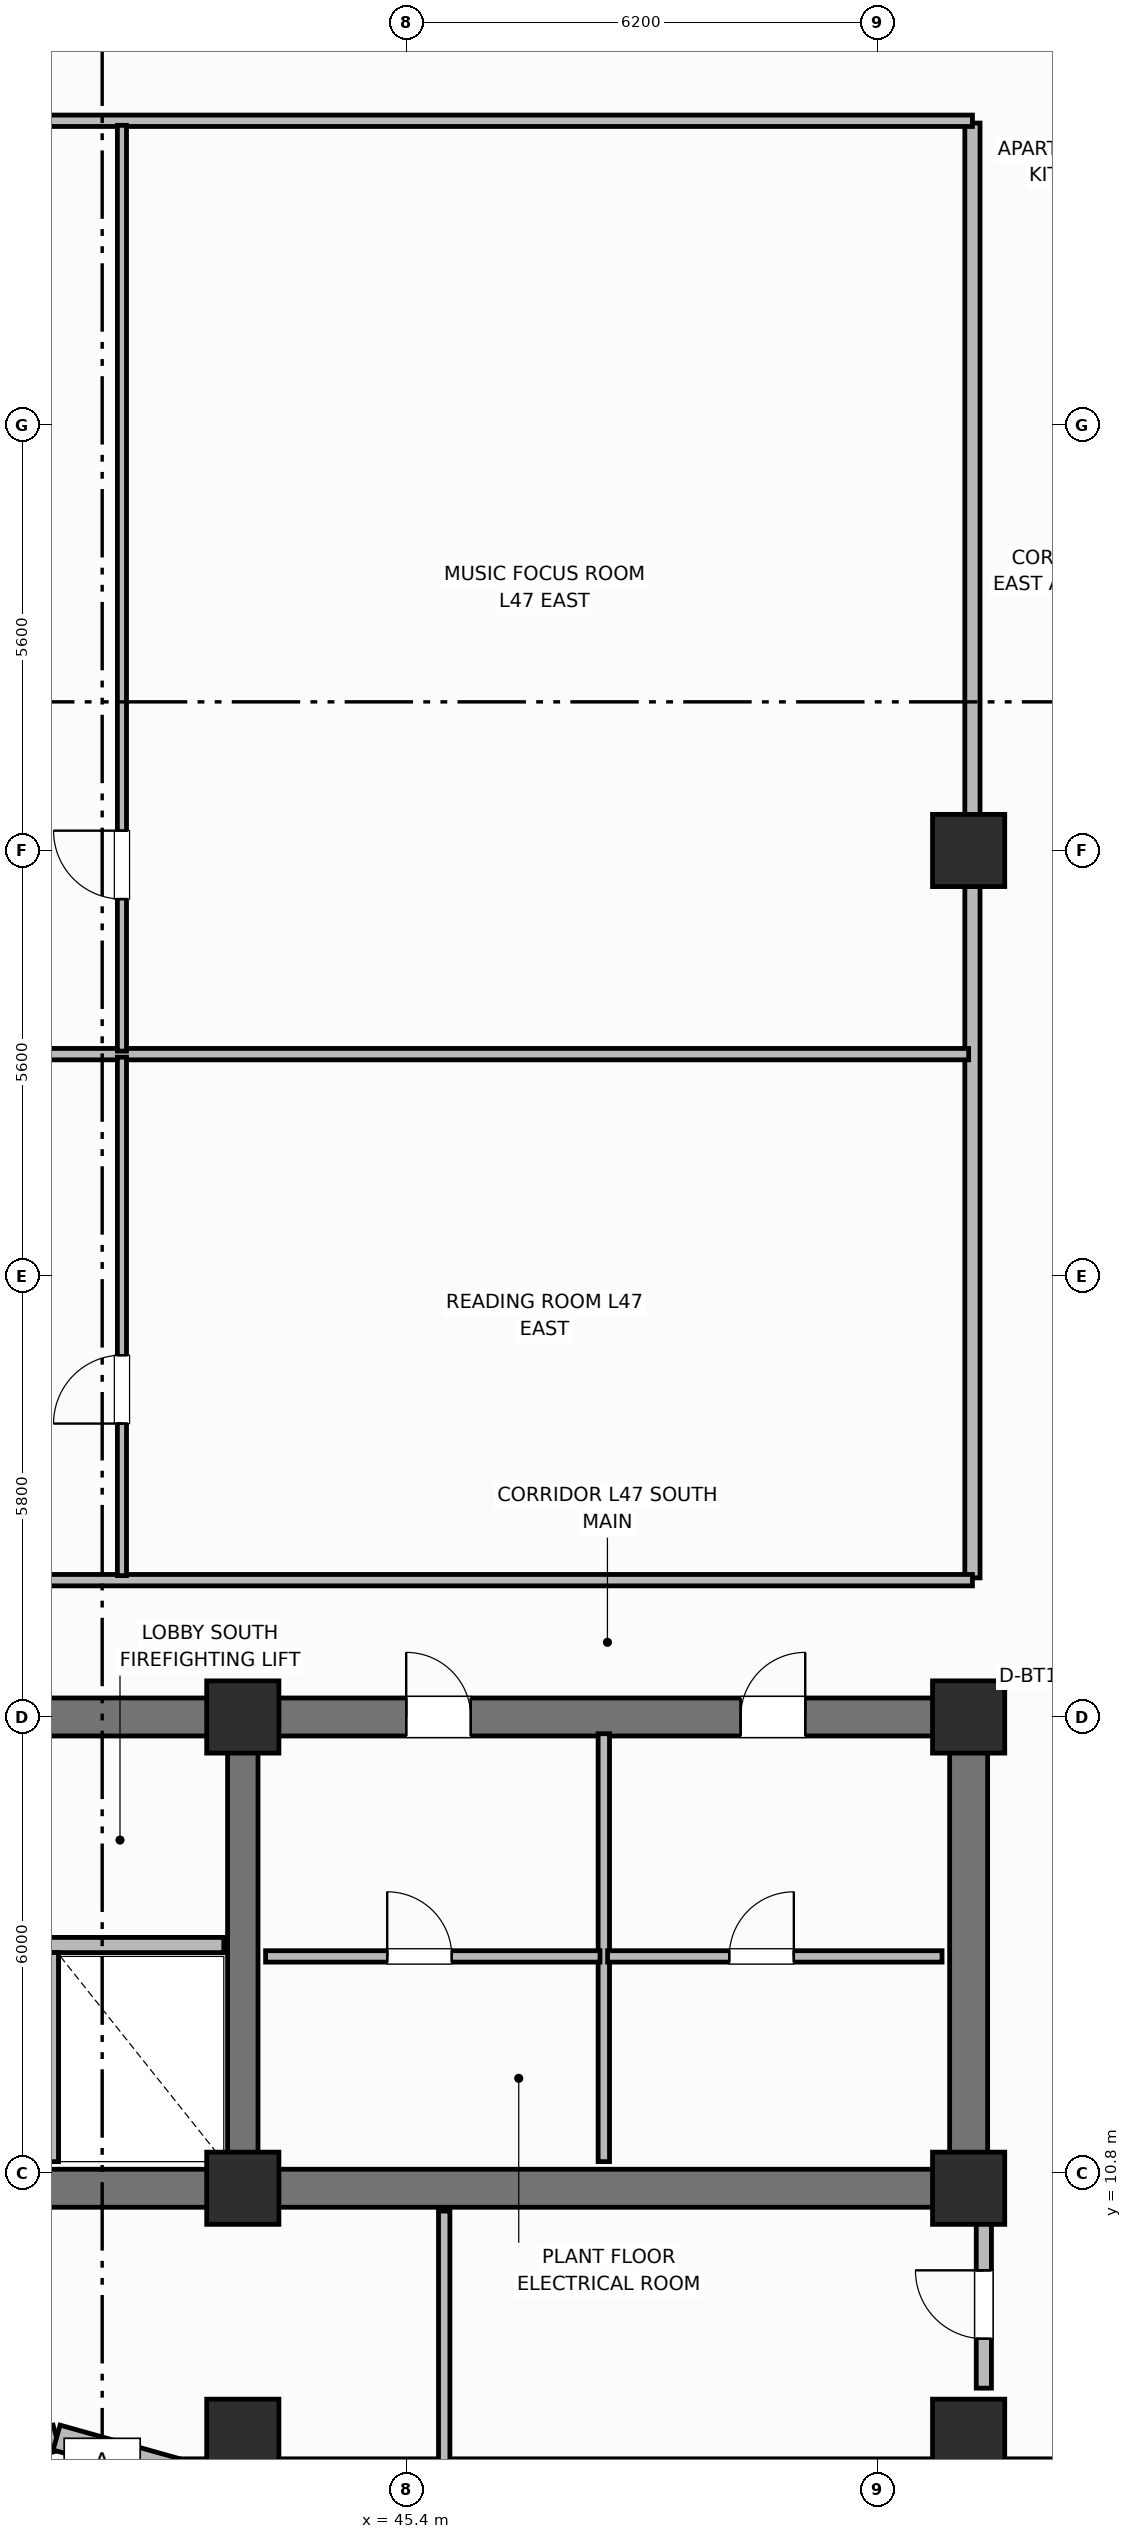
"""IFC4 building model, lengths in metres.
Left out: names, types, materials, properties, quantities, classifications, styles, units other than length and angle.
Written with IfcOpenShell. Run it as: python <this file> out.ifc"""

import sys

from ifc_helpers import new_model, si_unit, direction, frame, frame_2d, origin, origin_2d, place, context, subcontext, project, spatial, rectangle, extrude, element, fill, save


model = new_model("IFC4")
c1 = context("Model", 3, precision=1e-05, world=origin(), true_north=direction((0.0, 1.0)))
c2 = subcontext(c1, "Body", "Model", "MODEL_VIEW")
j1 = project(units=[si_unit("LENGTHUNIT", "METRE"), si_unit("PLANEANGLEUNIT", "RADIAN")], contexts=[c1])
p1 = place(None, origin())
s1 = spatial("IfcSite", under=j1, at=p1, CompositionType="ELEMENT")
p2 = place(p1, origin())
s2 = spatial("IfcBuilding", under=s1, at=p2, CompositionType="ELEMENT")
p3 = place(p2, frame((0.0, 0.0, 188.5)))
s3 = spatial("IfcBuildingStorey", under=s2, at=p3, CompositionType="ELEMENT", Elevation=188.5)
p4 = place(p3, frame((52.8, 10.6, 0.0), z_axis=(0.0, 0.0, 1.0), x_axis=(-1.0, 0.0, 0.0)))
e1 = element("IfcWall", 1, at=p4, inside=s3, PredefinedType="SHEAR", context=c2, shape_type="SweptSolid", body=[
    extrude(rectangle(XDim=27.2, YDim=0.5, at=frame_2d((13.6, 0.0))), origin(), (0.0, 0.0, 1.0), 3.7),
])
p5 = place(p3, frame((52.8, 10.85, 0.0), z_axis=(0.0, 0.0, 1.0), x_axis=(0.0, 1.0, 0.0)))
e2 = element("IfcWall", 2, at=p5, inside=s3, PredefinedType="SHEAR", context=c2, shape_type="SweptSolid", body=[
    extrude(rectangle(XDim=5.7, YDim=0.5, at=frame_2d((2.85, 0.0))), origin(), (0.0, 0.0, 1.0), 3.7),
])
p6 = place(p3, frame((25.6, 16.8, 0.0), z_axis=(0.0, 0.0, 1.0), x_axis=(1.0, 0.0, 0.0)))
e3 = element("IfcWall", 3, at=p6, inside=s3, PredefinedType="SHEAR", context=c2, shape_type="SweptSolid", body=[
    extrude(rectangle(XDim=27.2, YDim=0.5, at=frame_2d((13.6, 0.0))), origin(), (0.0, 0.0, 1.0), 3.7),
])
p7 = place(p6, frame((1.7, 0.0, 0.0)))
e4 = element("IfcOpeningElement", 4, at=p7, cuts=e3, PredefinedType="OPENING", context=c2, shape_type="SweptSolid", body=[
    extrude(rectangle(XDim=1.1, YDim=2.15, at=frame_2d((0.55, 1.075))), frame((0.0, 0.26, 0.0), z_axis=(0.0, -1.0, 0.0), x_axis=(1.0, 0.0, 0.0)), (0.0, 0.0, 1.0), 0.52),
])
p8 = place(p6, frame((4.45, 0.0, 0.0)))
e5 = element("IfcOpeningElement", 5, at=p8, cuts=e3, PredefinedType="OPENING", context=c2, shape_type="SweptSolid", body=[
    extrude(rectangle(XDim=0.85, YDim=2.1, at=frame_2d((0.425, 1.05))), frame((0.0, 0.26, 0.0), z_axis=(0.0, -1.0, 0.0), x_axis=(1.0, 0.0, 0.0)), (0.0, 0.0, 1.0), 0.52),
])
p9 = place(p6, frame((6.5, 0.0, 0.0)))
e6 = element("IfcOpeningElement", 6, at=p9, cuts=e3, PredefinedType="OPENING", context=c2, shape_type="SweptSolid", body=[
    extrude(rectangle(XDim=0.85, YDim=2.1, at=frame_2d((0.425, 1.05))), frame((0.0, 0.26, 0.0), z_axis=(0.0, -1.0, 0.0), x_axis=(1.0, 0.0, 0.0)), (0.0, 0.0, 1.0), 0.52),
])
p10 = place(p6, frame((13.0, 0.0, 0.0)))
e7 = element("IfcOpeningElement", 7, at=p10, cuts=e3, PredefinedType="OPENING", context=c2, shape_type="SweptSolid", body=[
    extrude(rectangle(XDim=1.2, YDim=2.15, at=frame_2d((0.6, 1.075))), frame((0.0, 0.26, 0.0), z_axis=(0.0, -1.0, 0.0), x_axis=(1.0, 0.0, 0.0)), (0.0, 0.0, 1.0), 0.52),
])
p11 = place(p6, frame((19.8, 0.0, 0.0)))
e8 = element("IfcOpeningElement", 8, at=p11, cuts=e3, PredefinedType="OPENING", context=c2, shape_type="SweptSolid", body=[
    extrude(rectangle(XDim=0.85, YDim=2.1, at=frame_2d((0.425, 1.05))), frame((0.0, 0.26, 0.0), z_axis=(0.0, -1.0, 0.0), x_axis=(1.0, 0.0, 0.0)), (0.0, 0.0, 1.0), 0.52),
])
p12 = place(p6, frame((24.2, 0.0, 0.0)))
e9 = element("IfcOpeningElement", 9, at=p12, cuts=e3, PredefinedType="OPENING", context=c2, shape_type="SweptSolid", body=[
    extrude(rectangle(XDim=0.85, YDim=2.1, at=frame_2d((0.425, 1.05))), frame((0.0, 0.26, 0.0), z_axis=(0.0, -1.0, 0.0), x_axis=(1.0, 0.0, 0.0)), (0.0, 0.0, 1.0), 0.52),
])
p13 = place(p3, frame((43.25, 10.85, 0.0), z_axis=(0.0, 0.0, 1.0), x_axis=(0.0, 1.0, 0.0)))
e10 = element("IfcWall", 10, at=p13, inside=s3, PredefinedType="SHEAR", context=c2, shape_type="SweptSolid", body=[
    extrude(rectangle(XDim=5.7, YDim=0.4, at=frame_2d((2.85, 0.0))), origin(), (0.0, 0.0, 1.0), 3.7),
])
for number, where, z_axis, x_axis in (
    (11, (43.25, 10.6, 0.0), (0.0, 0.0, 1.0), (1.0, 0.0, 0.0)),
    (12, (43.25, 16.8, 0.0), (0.0, 0.0, 1.0), (1.0, 0.0, 0.0)),
    (13, (52.8, 10.6, 0.0), (0.0, 0.0, 1.0), (1.0, 0.0, 0.0)),
    (14, (52.8, 16.8, 0.0), (0.0, 0.0, 1.0), (1.0, 0.0, 0.0)),
    (15, (52.8, 28.2, 0.0), (0.0, 0.0, 1.0), (1.0, 0.0, 0.0)),
    (16, (43.25, 7.35, 0.0), (0.0, 0.0, 1.0), (1.0, 0.0, 0.0)),
    (17, (52.8, 7.35, 0.0), (0.0, 0.0, 1.0), (1.0, 0.0, 0.0)),
):
    element("IfcColumn", number, at=place(p3, frame(where, z_axis=z_axis, x_axis=x_axis)), inside=s3, PredefinedType="COLUMN", context=c2, shape_type="SweptSolid", body=[
        extrude(rectangle(XDim=0.95, YDim=0.95, at=origin_2d()), origin(), (0.0, 0.0, 1.0), 3.7),
    ])
p14 = place(p3, frame((39.2, 6.87, 0.0), z_axis=(0.0, 0.0, 1.0), x_axis=(0.962662902433, 0.270703040766, 0.0)))
e18 = element("IfcWall", 18, at=p14, inside=s3, PredefinedType="SOLIDWALL", context=c2, shape_type="SweptSolid", body=[
    extrude(rectangle(XDim=1.662, YDim=0.34, at=frame_2d((0.831, 0.0))), origin(), (0.0, 0.0, 1.0), 2.72),
])
p15 = place(p3, frame((40.8, 7.32, 0.0), z_axis=(0.0, 0.0, 1.0), x_axis=(0.962652136636, -0.270741322725, 0.0)))
e19 = element("IfcWall", 19, at=p15, inside=s3, PredefinedType="SOLIDWALL", context=c2, shape_type="SweptSolid", body=[
    extrude(rectangle(XDim=1.662, YDim=0.34, at=frame_2d((0.831, 0.0))), origin(), (0.0, 0.0, 1.0), 2.72),
])
p16 = place(p3, frame((42.4, 6.87, 0.0), z_axis=(0.0, 0.0, 1.0), x_axis=(1.0, 0.0, 0.0)))
e20 = element("IfcWall", 20, at=p16, inside=s3, PredefinedType="SOLIDWALL", context=c2, shape_type="SweptSolid", body=[
    extrude(rectangle(XDim=15.8, YDim=0.34, at=frame_2d((7.9, 0.0))), origin(), (0.0, 0.0, 1.0), 2.72),
])
p17 = place(p16, frame((5.387, 0.0, 0.75)))
e21 = element("IfcOpeningElement", 21, at=p17, cuts=e20, PredefinedType="OPENING", context=c2, shape_type="SweptSolid", body=[
    extrude(rectangle(XDim=1.4, YDim=1.85, at=frame_2d((0.7, 0.925))), frame((0.0, 0.18, 0.0), z_axis=(0.0, -1.0, 0.0), x_axis=(1.0, 0.0, 0.0)), (0.0, 0.0, 1.0), 0.36),
])
p18 = place(p3, frame((35.4, 13.8, 0.0), z_axis=(0.0, 0.0, 1.0), x_axis=(1.0, 0.0, 0.0)))
e22 = element("IfcWall", 22, at=p18, inside=s3, PredefinedType="PARTITIONING", context=c2, shape_type="SweptSolid", body=[
    extrude(rectangle(XDim=7.6, YDim=0.2, at=frame_2d((3.8, 0.0))), origin(), (0.0, 0.0, 1.0), 2.32),
])
p19 = place(p18, frame((0.7, 0.0, 0.0)))
e23 = element("IfcOpeningElement", 23, at=p19, cuts=e22, PredefinedType="OPENING", context=c2, shape_type="SweptSolid", body=[
    extrude(rectangle(XDim=1.1, YDim=2.15, at=frame_2d((0.55, 1.075))), frame((0.0, 0.11, 0.0), z_axis=(0.0, -1.0, 0.0), x_axis=(1.0, 0.0, 0.0)), (0.0, 0.0, 1.0), 0.22),
])
p20 = place(p18, frame((3.35, 0.0, 0.0)))
e24 = element("IfcOpeningElement", 24, at=p20, cuts=e22, PredefinedType="OPENING", context=c2, shape_type="SweptSolid", body=[
    extrude(rectangle(XDim=1.2, YDim=2.15, at=frame_2d((0.6, 1.075))), frame((0.0, 0.11, 0.0), z_axis=(0.0, -1.0, 0.0), x_axis=(1.0, 0.0, 0.0)), (0.0, 0.0, 1.0), 0.22),
])
p21 = place(p3, frame((40.75, 10.95, 0.0), z_axis=(0.0, 0.0, 1.0), x_axis=(0.0, 1.0, 0.0)))
e25 = element("IfcWall", 25, at=p21, inside=s3, PredefinedType="PARTITIONING", context=c2, shape_type="SweptSolid", body=[
    extrude(rectangle(XDim=2.75, YDim=0.15, at=frame_2d((1.375, 0.0))), origin(), (0.0, 0.0, 1.0), 2.55),
])
p22 = place(p3, frame((48.0, 10.95, 0.0), z_axis=(0.0, 0.0, 1.0), x_axis=(0.0, 1.0, 0.0)))
e26 = element("IfcWall", 26, at=p22, inside=s3, PredefinedType="PARTITIONING", context=c2, shape_type="SweptSolid", body=[
    extrude(rectangle(XDim=5.63, YDim=0.15, at=frame_2d((2.815, 0.0))), origin(), (0.0, 0.0, 1.0), 2.55),
])
p23 = place(p3, frame((43.55, 13.65, 0.0), z_axis=(0.0, 0.0, 1.0), x_axis=(1.0, 0.0, 0.0)))
e27 = element("IfcWall", 27, at=p23, inside=s3, PredefinedType="PARTITIONING", context=c2, shape_type="SweptSolid", body=[
    extrude(rectangle(XDim=4.4, YDim=0.15, at=frame_2d((2.2, 0.0))), origin(), (0.0, 0.0, 1.0), 2.55),
])
p24 = place(p23, frame((1.6, 0.0, 0.0)))
e28 = element("IfcOpeningElement", 28, at=p24, cuts=e27, PredefinedType="OPENING", context=c2, shape_type="SweptSolid", body=[
    extrude(rectangle(XDim=0.85, YDim=2.1, at=frame_2d((0.425, 1.05))), frame((0.0, 0.085, 0.0), z_axis=(0.0, -1.0, 0.0), x_axis=(1.0, 0.0, 0.0)), (0.0, 0.0, 1.0), 0.17),
])
p25 = place(p3, frame((48.05, 13.65, 0.0), z_axis=(0.0, 0.0, 1.0), x_axis=(1.0, 0.0, 0.0)))
e29 = element("IfcWall", 29, at=p25, inside=s3, PredefinedType="PARTITIONING", context=c2, shape_type="SweptSolid", body=[
    extrude(rectangle(XDim=4.4, YDim=0.15, at=frame_2d((2.2, 0.0))), origin(), (0.0, 0.0, 1.0), 2.55),
])
p26 = place(p25, frame((1.6, 0.0, 0.0)))
e30 = element("IfcOpeningElement", 30, at=p26, cuts=e29, PredefinedType="OPENING", context=c2, shape_type="SweptSolid", body=[
    extrude(rectangle(XDim=0.85, YDim=2.1, at=frame_2d((0.425, 1.05))), frame((0.0, 0.085, 0.0), z_axis=(0.0, -1.0, 0.0), x_axis=(1.0, 0.0, 0.0)), (0.0, 0.0, 1.0), 0.17),
])
p27 = place(p3, frame((52.85, 18.63, 0.0), z_axis=(0.0, 0.0, 1.0), x_axis=(0.0, 1.0, 0.0)))
e31 = element("IfcWall", 31, at=p27, inside=s3, PredefinedType="PARTITIONING", context=c2, shape_type="SweptSolid", body=[
    extrude(rectangle(XDim=19.14, YDim=0.2, at=frame_2d((9.57, 0.0))), origin(), (0.0, 0.0, 1.0), 2.55),
])
for number, where, z_axis, x_axis in (
    (32, (30.55, 18.6, 0.0), (0.0, 0.0, 1.0), (1.0, 0.0, 0.0)),
    (33, (30.55, 37.8, 0.0), (0.0, 0.0, 1.0), (1.0, 0.0, 0.0)),
):
    element("IfcWall", number, at=place(p3, frame(where, z_axis=z_axis, x_axis=x_axis)), inside=s3, PredefinedType="PARTITIONING", context=c2, shape_type="SweptSolid", body=[
        extrude(rectangle(XDim=22.3, YDim=0.15, at=frame_2d((11.15, 0.0))), origin(), (0.0, 0.0, 1.0), 2.55),
    ])
p28 = place(p3, frame((30.58, 25.521, 0.0), z_axis=(0.0, 0.0, 1.0), x_axis=(1.0, 0.0, 0.0)))
e34 = element("IfcWall", 34, at=p28, inside=s3, PredefinedType="PARTITIONING", context=c2, shape_type="SweptSolid", body=[
    extrude(rectangle(XDim=22.22, YDim=0.15, at=frame_2d((11.11, 0.0))), origin(), (0.0, 0.0, 1.0), 2.55),
])
p29 = place(p3, frame((41.66, 18.66, 0.0), z_axis=(0.0, 0.0, 1.0), x_axis=(0.0, 1.0, 0.0)))
e35 = element("IfcWall", 35, at=p29, inside=s3, PredefinedType="PARTITIONING", context=c2, shape_type="SweptSolid", body=[
    extrude(rectangle(XDim=6.821, YDim=0.12, at=frame_2d((3.41, 0.0))), origin(), (0.0, 0.0, 1.0), 2.55),
])
p30 = place(p29, frame((2.0, 0.0, 0.0)))
e36 = element("IfcOpeningElement", 36, at=p30, cuts=e35, PredefinedType="OPENING", context=c2, shape_type="SweptSolid", body=[
    extrude(rectangle(XDim=0.9, YDim=2.1, at=frame_2d((0.45, 1.05))), frame((0.0, 0.07, 0.0), z_axis=(0.0, -1.0, 0.0), x_axis=(1.0, 0.0, 0.0)), (0.0, 0.0, 1.0), 0.14),
])
p31 = place(p3, frame((41.66, 25.56, 0.0), z_axis=(0.0, 0.0, 1.0), x_axis=(0.0, 1.0, 0.0)))
e37 = element("IfcWall", 37, at=p31, inside=s3, PredefinedType="PARTITIONING", context=c2, shape_type="SweptSolid", body=[
    extrude(rectangle(XDim=12.18, YDim=0.12, at=frame_2d((6.09, 0.0))), origin(), (0.0, 0.0, 1.0), 2.55),
])
p32 = place(p31, frame((2.0, 0.0, 0.0)))
e38 = element("IfcOpeningElement", 38, at=p32, cuts=e37, PredefinedType="OPENING", context=c2, shape_type="SweptSolid", body=[
    extrude(rectangle(XDim=0.9, YDim=2.1, at=frame_2d((0.45, 1.05))), frame((0.0, 0.07, 0.0), z_axis=(0.0, -1.0, 0.0), x_axis=(1.0, 0.0, 0.0)), (0.0, 0.0, 1.0), 0.14),
])
p33 = place(p3, frame((45.9, 6.87, 0.0), z_axis=(0.0, 0.0, 1.0), x_axis=(0.0, 1.0, 0.0)))
e39 = element("IfcWall", 39, at=p33, inside=s3, PredefinedType="PARTITIONING", context=c2, shape_type="SweptSolid", body=[
    extrude(rectangle(XDim=3.43, YDim=0.15, at=frame_2d((1.715, 0.0))), origin(), (0.0, 0.0, 1.0), 2.55),
])
p34 = place(p3, frame((53.0, 7.97, 0.0), z_axis=(0.0, 0.0, 1.0), x_axis=(0.0, 1.0, 0.0)))
e40 = element("IfcWall", 40, at=p34, inside=s3, PredefinedType="PARTITIONING", context=c2, shape_type="SweptSolid", body=[
    extrude(rectangle(XDim=2.33, YDim=0.2, at=frame_2d((1.165, 0.0))), origin(), (0.0, 0.0, 1.0), 2.55),
])
p35 = place(p34, frame((0.65, 0.0, 0.0)))
e41 = element("IfcOpeningElement", 41, at=p35, cuts=e40, PredefinedType="OPENING", context=c2, shape_type="SweptSolid", body=[
    extrude(rectangle(XDim=0.9, YDim=2.1, at=frame_2d((0.45, 1.05))), frame((0.0, 0.11, 0.0), z_axis=(0.0, -1.0, 0.0), x_axis=(1.0, 0.0, 0.0)), (0.0, 0.0, 1.0), 0.22),
])
p36 = place(p24, origin())
e42 = element("IfcDoor", 42, at=p36, inside=s3, OperationType="SINGLE_SWING_LEFT", PredefinedType="DOOR", context=c2, shape_type="SweptSolid", body=[
    extrude(rectangle(XDim=0.85, YDim=2.1, at=frame_2d((0.425, 1.05))), frame((0.0, 0.025, 0.0), z_axis=(0.0, -1.0, 0.0), x_axis=(1.0, 0.0, 0.0)), (0.0, 0.0, 1.0), 0.05),
])
fill(e28, e42)
p37 = place(p26, origin())
e43 = element("IfcDoor", 43, at=p37, inside=s3, OperationType="SINGLE_SWING_RIGHT", PredefinedType="DOOR", context=c2, shape_type="SweptSolid", body=[
    extrude(rectangle(XDim=0.85, YDim=2.1, at=frame_2d((0.425, 1.05))), frame((0.0, 0.025, 0.0), z_axis=(0.0, -1.0, 0.0), x_axis=(1.0, 0.0, 0.0)), (0.0, 0.0, 1.0), 0.05),
])
fill(e30, e43)
p38 = place(p30, origin())
e44 = element("IfcDoor", 44, at=p38, inside=s3, OperationType="SINGLE_SWING_LEFT", PredefinedType="DOOR", context=c2, shape_type="SweptSolid", body=[
    extrude(rectangle(XDim=0.9, YDim=2.1, at=frame_2d((0.45, 1.05))), frame((0.0, 0.025, 0.0), z_axis=(0.0, -1.0, 0.0), x_axis=(1.0, 0.0, 0.0)), (0.0, 0.0, 1.0), 0.05),
])
fill(e36, e44)
p39 = place(p32, origin())
e45 = element("IfcDoor", 45, at=p39, inside=s3, OperationType="SINGLE_SWING_RIGHT", PredefinedType="DOOR", context=c2, shape_type="SweptSolid", body=[
    extrude(rectangle(XDim=0.9, YDim=2.1, at=frame_2d((0.45, 1.05))), frame((0.0, 0.025, 0.0), z_axis=(0.0, -1.0, 0.0), x_axis=(1.0, 0.0, 0.0)), (0.0, 0.0, 1.0), 0.05),
])
fill(e38, e45)
p40 = place(p35, origin())
e46 = element("IfcDoor", 46, at=p40, inside=s3, OperationType="SINGLE_SWING_RIGHT", PredefinedType="DOOR", context=c2, shape_type="SweptSolid", body=[
    extrude(rectangle(XDim=0.9, YDim=2.1, at=frame_2d((0.45, 1.05))), frame((0.0, 0.025, 0.0), z_axis=(0.0, -1.0, 0.0), x_axis=(1.0, 0.0, 0.0)), (0.0, 0.0, 1.0), 0.05),
])
fill(e41, e46)
p41 = place(p11, origin())
e47 = element("IfcDoor", 47, at=p41, inside=s3, OperationType="SINGLE_SWING_LEFT", PredefinedType="DOOR", context=c2, shape_type="SweptSolid", body=[
    extrude(rectangle(XDim=0.85, YDim=2.1, at=frame_2d((0.425, 1.05))), frame((0.0, 0.025, 0.0), z_axis=(0.0, -1.0, 0.0), x_axis=(1.0, 0.0, 0.0)), (0.0, 0.0, 1.0), 0.05),
])
fill(e8, e47)
p42 = place(p12, origin())
e48 = element("IfcDoor", 48, at=p42, inside=s3, OperationType="SINGLE_SWING_RIGHT", PredefinedType="DOOR", context=c2, shape_type="SweptSolid", body=[
    extrude(rectangle(XDim=0.85, YDim=2.1, at=frame_2d((0.425, 1.05))), frame((0.0, 0.025, 0.0), z_axis=(0.0, -1.0, 0.0), x_axis=(1.0, 0.0, 0.0)), (0.0, 0.0, 1.0), 0.05),
])
fill(e9, e48)
save(model, sys.argv[1])
